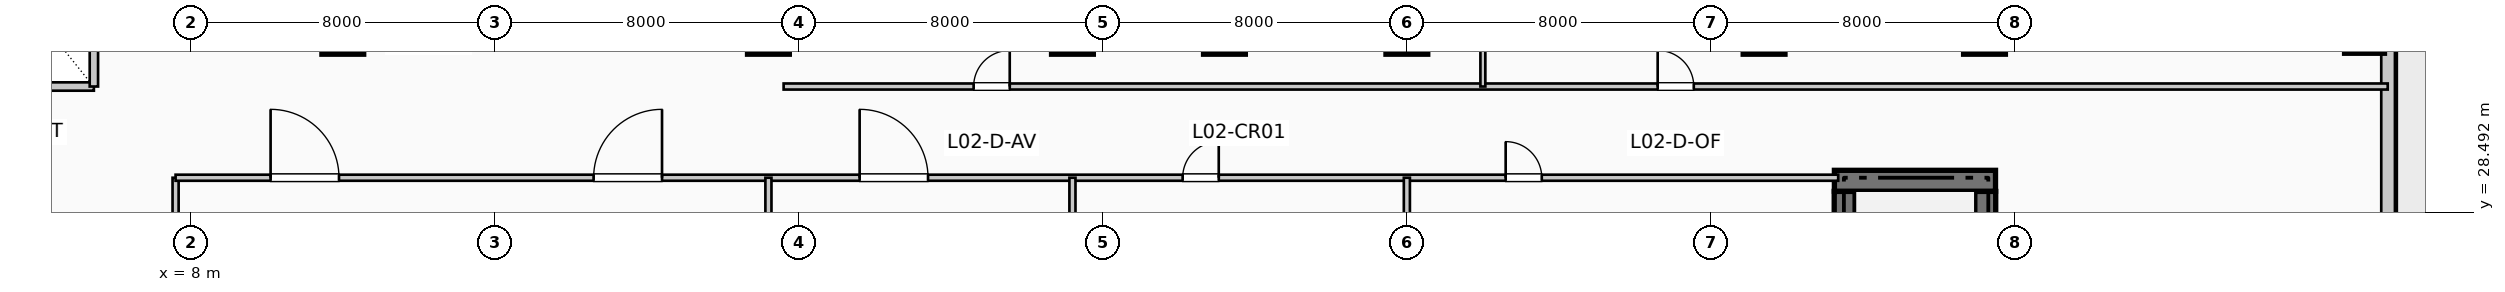
"""IFC4 building model, lengths in metres.
Left out: names, types, materials, properties, quantities, classifications, styles, units other than length and angle.
Written with IfcOpenShell. Run it as: python <this file> out.ifc"""

import sys

from ifc_helpers import new_model, si_unit, direction, frame, frame_2d, origin, origin_2d, place, context, subcontext, project, spatial, rectangle, extrude, element, fill, save


model = new_model("IFC4")
c1 = context("Model", 3, precision=1e-05, world=origin(), true_north=direction((0.0, 1.0)))
c2 = subcontext(c1, "Body", "Model", "MODEL_VIEW")
j1 = project(units=[si_unit("LENGTHUNIT", "METRE"), si_unit("PLANEANGLEUNIT", "RADIAN")], contexts=[c1])
p1 = place(None, origin())
s1 = spatial("IfcSite", under=j1, at=p1, CompositionType="ELEMENT")
p2 = place(p1, origin())
s2 = spatial("IfcBuilding", under=s1, at=p2, CompositionType="ELEMENT")
p3 = place(p2, frame((0.0, 0.0, 11.22)))
s3 = spatial("IfcBuildingStorey", under=s2, at=p3, CompositionType="ELEMENT", Elevation=11.22)
for number, where, z_axis, x_axis in (
    (1, (51.52, 21.15, 0.0), (0.0, 0.0, 1.0), (0.0, 1.0, 0.0)),
    (2, (55.22, 21.15, 0.0), (0.0, 0.0, 1.0), (0.0, 1.0, 0.0)),
):
    element("IfcWall", number, at=place(p3, frame(where, z_axis=z_axis, x_axis=x_axis)), inside=s3, PredefinedType="SHEAR", context=c2, shape_type="SweptSolid", body=[
        extrude(rectangle(XDim=7.89, YDim=0.55, at=frame_2d((3.945, 0.0))), origin(), (0.0, 0.0, 1.0), 5.28),
    ])
p4 = place(p3, frame((51.25, 29.32, 0.0), z_axis=(0.0, 0.0, 1.0), x_axis=(1.0, 0.0, 0.0)))
e3 = element("IfcWall", 3, at=p4, inside=s3, PredefinedType="SHEAR", context=c2, shape_type="SweptSolid", body=[
    extrude(rectangle(XDim=4.24, YDim=0.55, at=frame_2d((2.12, 0.0))), origin(), (0.0, 0.0, 1.0), 5.28),
])
for number, where, z_axis, x_axis in (
    (4, (12.0, 33.2, 0.0), (0.0, 0.0, 1.0), (1.0, 0.0, 0.0)),
    (5, (23.2, 33.2, 0.0), (0.0, 0.0, 1.0), (1.0, 0.0, 0.0)),
    (6, (31.2, 33.2, 0.0), (0.0, 0.0, 1.0), (1.0, 0.0, 0.0)),
    (7, (35.2, 33.2, 0.0), (0.0, 0.0, 1.0), (1.0, 0.0, 0.0)),
    (8, (40.0, 33.2, 0.0), (0.0, 0.0, 1.0), (1.0, 0.0, 0.0)),
    (9, (49.4, 33.2, 0.0), (0.0, 0.0, 1.0), (1.0, 0.0, 0.0)),
    (10, (55.2, 33.2, 0.0), (0.0, 0.0, 1.0), (1.0, 0.0, 0.0)),
):
    element("IfcColumn", number, at=place(p3, frame(where, z_axis=z_axis, x_axis=x_axis)), inside=s3, PredefinedType="COLUMN", context=c2, shape_type="SweptSolid", body=[
        extrude(rectangle(XDim=1.1, YDim=1.1, at=origin_2d()), origin(), (0.0, 0.0, 1.0), 5.28),
    ])
p5 = place(p3, frame((65.2, 33.2, 0.0), z_axis=(0.0, 0.0, 1.0), x_axis=(1.0, 0.0, 0.0)))
e11 = element("IfcColumn", 11, at=p5, inside=s3, PredefinedType="COLUMN", context=c2, shape_type="SweptSolid", body=[
    extrude(rectangle(XDim=1.05, YDim=1.05, at=origin_2d()), origin(), (0.0, 0.0, 1.0), 5.28),
])
p6 = place(p3, frame((65.82, 19.055, 0.0), z_axis=(0.0, 0.0, 1.0), x_axis=(0.0, 1.0, 0.0)))
e12 = element("IfcWall", 12, at=p6, inside=s3, PredefinedType="SOLIDWALL", context=c2, shape_type="SweptSolid", body=[
    extrude(rectangle(XDim=25.89, YDim=0.36, at=frame_2d((12.945, 0.0))), origin(), (0.0, 0.0, 1.0), 4.96),
])
p7 = place(p6, frame((19.141, 0.0, 0.0), z_axis=(0.0, 0.0, 1.0), x_axis=(-1.0, 0.0, 0.0)))
e13 = element("IfcOpeningElement", 13, at=p7, cuts=e12, PredefinedType="OPENING", context=c2, shape_type="SweptSolid", body=[
    extrude(rectangle(XDim=1.1, YDim=2.2, at=frame_2d((0.55, 1.1))), frame((0.0, 0.19, 0.0), z_axis=(0.0, -1.0, 0.0), x_axis=(1.0, 0.0, 0.0)), (0.0, 0.0, 1.0), 0.38),
])
p8 = place(p3, frame((1.55, 31.8, 0.0), z_axis=(0.0, 0.0, 1.0), x_axis=(1.0, 0.0, 0.0)))
e14 = element("IfcWall", 14, at=p8, inside=s3, PredefinedType="PARTITIONING", context=c2, shape_type="SweptSolid", body=[
    extrude(rectangle(XDim=3.9, YDim=0.22, at=frame_2d((1.95, 0.0))), origin(), (0.0, 0.0, 1.0), 4.96),
])
p9 = place(p3, frame((5.45, 31.8, 0.0), z_axis=(0.0, 0.0, 1.0), x_axis=(0.0, 1.0, 0.0)))
e15 = element("IfcWall", 15, at=p9, inside=s3, PredefinedType="PARTITIONING", context=c2, shape_type="SweptSolid", body=[
    extrude(rectangle(XDim=2.38, YDim=0.22, at=frame_2d((1.19, 0.0))), origin(), (0.0, 0.0, 1.0), 4.96),
])
p10 = place(p3, frame((7.6, -1.81, 0.0), z_axis=(0.0, 0.0, 1.0), x_axis=(0.0, 1.0, 0.0)))
e16 = element("IfcWall", 16, at=p10, inside=s3, PredefinedType="PARTITIONING", context=c2, shape_type="SweptSolid", body=[
    extrude(rectangle(XDim=31.21, YDim=0.16, at=frame_2d((15.605, 0.0))), origin(), (0.0, 0.0, 1.0), 4.96),
])
p11 = place(p3, frame((7.6, 29.4, 0.0), z_axis=(0.0, 0.0, 1.0), x_axis=(1.0, 0.0, 0.0)))
e17 = element("IfcWall", 17, at=p11, inside=s3, PredefinedType="PARTITIONING", context=c2, shape_type="SweptSolid", body=[
    extrude(rectangle(XDim=43.75, YDim=0.16, at=frame_2d((21.875, 0.0))), origin(), (0.0, 0.0, 1.0), 4.615),
])
p12 = place(p11, frame((2.5, 0.0, 0.0)))
e18 = element("IfcOpeningElement", 18, at=p12, cuts=e17, PredefinedType="OPENING", context=c2, shape_type="SweptSolid", body=[
    extrude(rectangle(XDim=1.8, YDim=2.3, at=frame_2d((0.9, 1.15))), frame((0.0, 0.09, 0.0), z_axis=(0.0, -1.0, 0.0), x_axis=(1.0, 0.0, 0.0)), (0.0, 0.0, 1.0), 0.18),
])
p13 = place(p11, frame((11.0, 0.0, 0.0)))
e19 = element("IfcOpeningElement", 19, at=p13, cuts=e17, PredefinedType="OPENING", context=c2, shape_type="SweptSolid", body=[
    extrude(rectangle(XDim=1.8, YDim=2.3, at=frame_2d((0.9, 1.15))), frame((0.0, 0.09, 0.0), z_axis=(0.0, -1.0, 0.0), x_axis=(1.0, 0.0, 0.0)), (0.0, 0.0, 1.0), 0.18),
])
p14 = place(p11, frame((18.0, 0.0, 0.0)))
e20 = element("IfcOpeningElement", 20, at=p14, cuts=e17, PredefinedType="OPENING", context=c2, shape_type="SweptSolid", body=[
    extrude(rectangle(XDim=1.8, YDim=2.3, at=frame_2d((0.9, 1.15))), frame((0.0, 0.09, 0.0), z_axis=(0.0, -1.0, 0.0), x_axis=(1.0, 0.0, 0.0)), (0.0, 0.0, 1.0), 0.18),
])
p15 = place(p11, frame((26.5, 0.0, 0.0)))
e21 = element("IfcOpeningElement", 21, at=p15, cuts=e17, PredefinedType="OPENING", context=c2, shape_type="SweptSolid", body=[
    extrude(rectangle(XDim=0.95, YDim=2.15, at=frame_2d((0.475, 1.075))), frame((0.0, 0.09, 0.0), z_axis=(0.0, -1.0, 0.0), x_axis=(1.0, 0.0, 0.0)), (0.0, 0.0, 1.0), 0.18),
])
p16 = place(p11, frame((35.0, 0.0, 0.0)))
e22 = element("IfcOpeningElement", 22, at=p16, cuts=e17, PredefinedType="OPENING", context=c2, shape_type="SweptSolid", body=[
    extrude(rectangle(XDim=0.95, YDim=2.15, at=frame_2d((0.475, 1.075))), frame((0.0, 0.09, 0.0), z_axis=(0.0, -1.0, 0.0), x_axis=(1.0, 0.0, 0.0)), (0.0, 0.0, 1.0), 0.18),
])
p17 = place(p3, frame((23.2, -1.81, 0.0), z_axis=(0.0, 0.0, 1.0), x_axis=(0.0, 1.0, 0.0)))
e23 = element("IfcWall", 23, at=p17, inside=s3, PredefinedType="PARTITIONING", context=c2, shape_type="SweptSolid", body=[
    extrude(rectangle(XDim=31.21, YDim=0.16, at=frame_2d((15.605, 0.0))), origin(), (0.0, 0.0, 1.0), 4.145),
])
for number, where, z_axis, x_axis in (
    (24, (31.2, 16.19, 0.0), (0.0, 0.0, 1.0), (0.0, 1.0, 0.0)),
    (25, (40.0, 16.19, 0.0), (0.0, 0.0, 1.0), (0.0, 1.0, 0.0)),
):
    element("IfcWall", number, at=place(p3, frame(where, z_axis=z_axis, x_axis=x_axis)), inside=s3, PredefinedType="PARTITIONING", context=c2, shape_type="SweptSolid", body=[
        extrude(rectangle(XDim=13.21, YDim=0.16, at=frame_2d((6.605, 0.0))), origin(), (0.0, 0.0, 1.0), 4.145),
    ])
p18 = place(p3, frame((23.6, 31.8, 0.0), z_axis=(0.0, 0.0, 1.0), x_axis=(1.0, 0.0, 0.0)))
e26 = element("IfcWall", 26, at=p18, inside=s3, PredefinedType="PARTITIONING", context=c2, shape_type="SweptSolid", body=[
    extrude(rectangle(XDim=42.21, YDim=0.16, at=frame_2d((21.105, 0.0))), origin(), (0.0, 0.0, 1.0), 4.96),
])
p19 = place(p18, frame((5.0, 0.0, 0.0)))
e27 = element("IfcOpeningElement", 27, at=p19, cuts=e26, PredefinedType="OPENING", context=c2, shape_type="SweptSolid", body=[
    extrude(rectangle(XDim=0.95, YDim=2.15, at=frame_2d((0.475, 1.075))), frame((0.0, 0.09, 0.0), z_axis=(0.0, -1.0, 0.0), x_axis=(1.0, 0.0, 0.0)), (0.0, 0.0, 1.0), 0.18),
])
p20 = place(p18, frame((23.0, 0.0, 0.0)))
e28 = element("IfcOpeningElement", 28, at=p20, cuts=e26, PredefinedType="OPENING", context=c2, shape_type="SweptSolid", body=[
    extrude(rectangle(XDim=0.95, YDim=2.15, at=frame_2d((0.475, 1.075))), frame((0.0, 0.09, 0.0), z_axis=(0.0, -1.0, 0.0), x_axis=(1.0, 0.0, 0.0)), (0.0, 0.0, 1.0), 0.18),
])
p21 = place(p3, frame((42.0, 31.8, 0.0), z_axis=(0.0, 0.0, 1.0), x_axis=(0.0, 1.0, 0.0)))
e29 = element("IfcWall", 29, at=p21, inside=s3, PredefinedType="PARTITIONING", context=c2, shape_type="SweptSolid", body=[
    extrude(rectangle(XDim=16.01, YDim=0.13, at=frame_2d((8.005, 0.0))), origin(), (0.0, 0.0, 1.0), 4.96),
])
p22 = place(p12, origin())
e30 = element("IfcDoor", 30, at=p22, inside=s3, OperationType="SINGLE_SWING_LEFT", PredefinedType="DOOR", context=c2, shape_type="SweptSolid", body=[
    extrude(rectangle(XDim=1.8, YDim=2.3, at=frame_2d((0.9, 1.15))), frame((0.0, 0.025, 0.0), z_axis=(0.0, -1.0, 0.0), x_axis=(1.0, 0.0, 0.0)), (0.0, 0.0, 1.0), 0.05),
])
fill(e18, e30)
p23 = place(p13, origin())
e31 = element("IfcDoor", 31, at=p23, inside=s3, OperationType="SINGLE_SWING_RIGHT", PredefinedType="DOOR", context=c2, shape_type="SweptSolid", body=[
    extrude(rectangle(XDim=1.8, YDim=2.3, at=frame_2d((0.9, 1.15))), frame((0.0, 0.025, 0.0), z_axis=(0.0, -1.0, 0.0), x_axis=(1.0, 0.0, 0.0)), (0.0, 0.0, 1.0), 0.05),
])
fill(e19, e31)
p24 = place(p14, origin())
e32 = element("IfcDoor", 32, at=p24, inside=s3, OperationType="SINGLE_SWING_LEFT", PredefinedType="DOOR", context=c2, shape_type="SweptSolid", body=[
    extrude(rectangle(XDim=1.8, YDim=2.3, at=frame_2d((0.9, 1.15))), frame((0.0, 0.025, 0.0), z_axis=(0.0, -1.0, 0.0), x_axis=(1.0, 0.0, 0.0)), (0.0, 0.0, 1.0), 0.05),
])
fill(e20, e32)
p25 = place(p15, origin())
e33 = element("IfcDoor", 33, at=p25, inside=s3, OperationType="SINGLE_SWING_RIGHT", PredefinedType="DOOR", context=c2, shape_type="SweptSolid", body=[
    extrude(rectangle(XDim=0.95, YDim=2.15, at=frame_2d((0.475, 1.075))), frame((0.0, 0.025, 0.0), z_axis=(0.0, -1.0, 0.0), x_axis=(1.0, 0.0, 0.0)), (0.0, 0.0, 1.0), 0.05),
])
fill(e21, e33)
p26 = place(p16, origin())
e34 = element("IfcDoor", 34, at=p26, inside=s3, OperationType="SINGLE_SWING_LEFT", PredefinedType="DOOR", context=c2, shape_type="SweptSolid", body=[
    extrude(rectangle(XDim=0.95, YDim=2.15, at=frame_2d((0.475, 1.075))), frame((0.0, 0.025, 0.0), z_axis=(0.0, -1.0, 0.0), x_axis=(1.0, 0.0, 0.0)), (0.0, 0.0, 1.0), 0.05),
])
fill(e22, e34)
p27 = place(p19, origin())
e35 = element("IfcDoor", 35, at=p27, inside=s3, OperationType="SINGLE_SWING_RIGHT", PredefinedType="DOOR", context=c2, shape_type="SweptSolid", body=[
    extrude(rectangle(XDim=0.95, YDim=2.15, at=frame_2d((0.475, 1.075))), frame((0.0, 0.025, 0.0), z_axis=(0.0, -1.0, 0.0), x_axis=(1.0, 0.0, 0.0)), (0.0, 0.0, 1.0), 0.05),
])
fill(e27, e35)
p28 = place(p20, origin())
e36 = element("IfcDoor", 36, at=p28, inside=s3, OperationType="SINGLE_SWING_LEFT", PredefinedType="DOOR", context=c2, shape_type="SweptSolid", body=[
    extrude(rectangle(XDim=0.95, YDim=2.15, at=frame_2d((0.475, 1.075))), frame((0.0, 0.025, 0.0), z_axis=(0.0, -1.0, 0.0), x_axis=(1.0, 0.0, 0.0)), (0.0, 0.0, 1.0), 0.05),
])
fill(e28, e36)
save(model, sys.argv[1])
